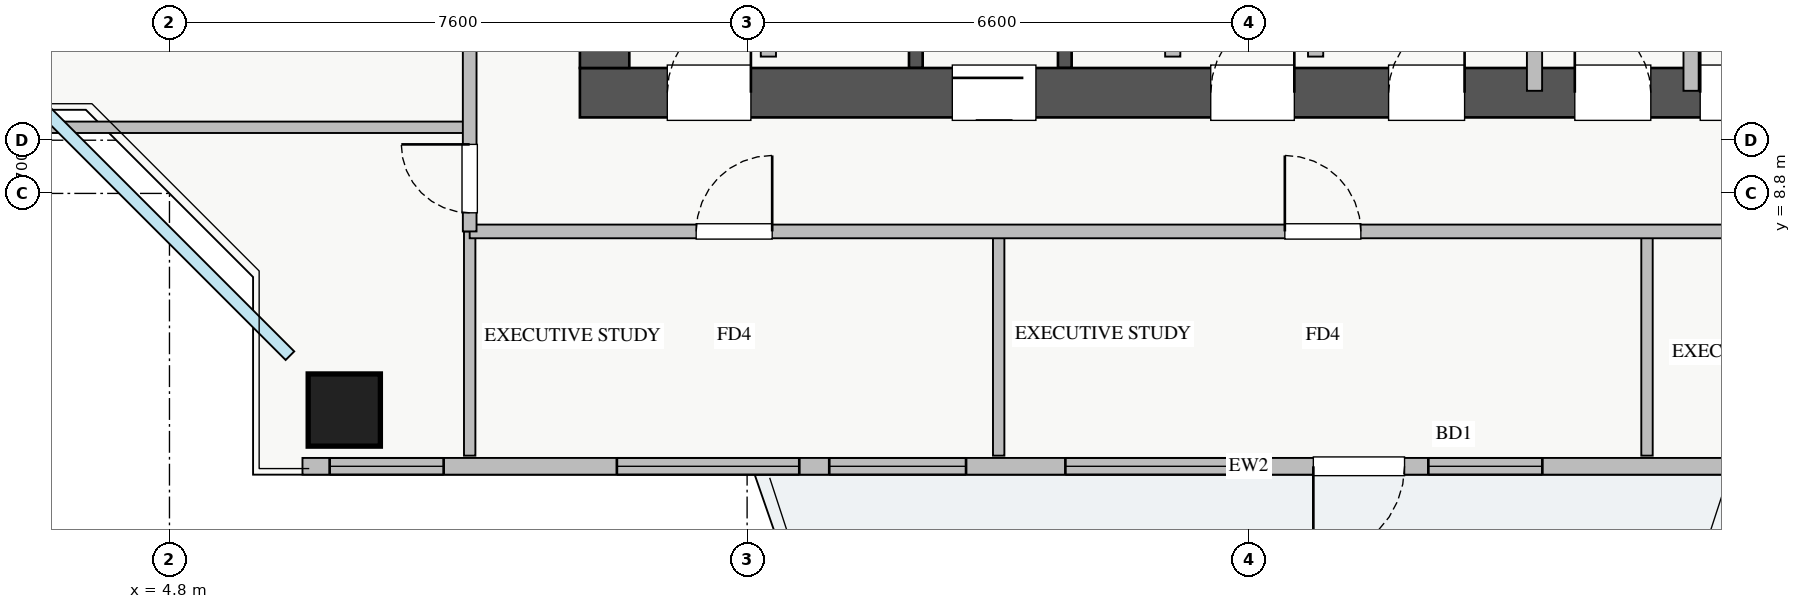
"""IFC4 building model, lengths in metres.
Left out: names, types, materials, properties, quantities, classifications, styles, units other than length and angle.
Written with IfcOpenShell. Run it as: python <this file> out.ifc"""

import sys

from ifc_helpers import new_model, si_unit, direction, frame, frame_2d, origin, origin_2d, place, context, subcontext, project, spatial, rectangle, extrude, source, transform, mapped, element, fill, save


model = new_model("IFC4")
c1 = context("Model", 3, precision=1e-05, world=origin(), true_north=direction((0.0, 1.0)))
c2 = subcontext(c1, "Body", "Model", "MODEL_VIEW")
j1 = project(units=[si_unit("LENGTHUNIT", "METRE"), si_unit("PLANEANGLEUNIT", "RADIAN")], contexts=[c1])
p1 = place(None, origin())
s1 = spatial("IfcSite", under=j1, at=p1, CompositionType="ELEMENT")
p2 = place(p1, origin())
s2 = spatial("IfcBuilding", under=s1, at=p2, CompositionType="ELEMENT")
p3 = place(p2, frame((0.0, 0.0, 150.25)))
s3 = spatial("IfcBuildingStorey", under=s2, at=p3, CompositionType="ELEMENT", Elevation=150.25)
for number, where, z_axis, x_axis in (
    (1, (14.62, 10.45, 0.0), (0.0, 0.0, 1.0), (0.0, 1.0, 0.0)),
    (2, (16.58, 10.45, 0.0), (0.0, 0.0, 1.0), (0.0, 1.0, 0.0)),
):
    element("IfcWall", number, at=place(p3, frame(where, z_axis=z_axis, x_axis=x_axis)), inside=s3, PredefinedType="SHEAR", context=c2, shape_type="SweptSolid", body=[
        extrude(rectangle(XDim=2.35, YDim=0.18, at=frame_2d((1.175, 0.0))), origin(), (0.0, 0.0, 1.0), 3.07),
    ])
p4 = place(p3, frame((10.2, 10.125, 0.0), z_axis=(0.0, 0.0, 1.0), x_axis=(1.0, 0.0, 0.0)))
e3 = element("IfcWall", 3, at=p4, inside=s3, PredefinedType="SHEAR", context=c2, shape_type="SweptSolid", body=[
    extrude(rectangle(XDim=17.6, YDim=0.65, at=frame_2d((8.8, 0.0))), origin(), (0.0, 0.0, 1.0), 3.25),
])
p5 = place(p4, frame((1.15, 0.0, 0.0)))
e4 = element("IfcOpeningElement", 4, at=p5, cuts=e3, PredefinedType="OPENING", context=c2, shape_type="SweptSolid", body=[
    extrude(rectangle(XDim=1.1, YDim=2.05, at=frame_2d((0.55, 1.025))), frame((0.0, 0.335, 0.0), z_axis=(0.0, -1.0, 0.0), x_axis=(1.0, 0.0, 0.0)), (0.0, 0.0, 1.0), 0.67),
])
p6 = place(p4, frame((8.3, 0.0, 0.0)))
e5 = element("IfcOpeningElement", 5, at=p6, cuts=e3, PredefinedType="OPENING", context=c2, shape_type="SweptSolid", body=[
    extrude(rectangle(XDim=1.1, YDim=2.05, at=frame_2d((0.55, 1.025))), frame((0.0, 0.335, 0.0), z_axis=(0.0, -1.0, 0.0), x_axis=(1.0, 0.0, 0.0)), (0.0, 0.0, 1.0), 0.67),
])
p7 = place(p4, frame((4.9, 0.0, 0.0)))
e6 = element("IfcOpeningElement", 6, at=p7, cuts=e3, PredefinedType="OPENING", context=c2, shape_type="SweptSolid", body=[
    extrude(rectangle(XDim=1.1, YDim=2.05, at=frame_2d((0.55, 1.025))), frame((0.0, 0.335, 0.0), z_axis=(0.0, -1.0, 0.0), x_axis=(1.0, 0.0, 0.0)), (0.0, 0.0, 1.0), 0.67),
])
p8 = place(p4, frame((14.74, 0.0, 0.0)))
e7 = element("IfcOpeningElement", 7, at=p8, cuts=e3, PredefinedType="OPENING", context=c2, shape_type="SweptSolid", body=[
    extrude(rectangle(XDim=1.0, YDim=2.05, at=frame_2d((0.5, 1.025))), frame((0.0, 0.335, 0.0), z_axis=(0.0, -1.0, 0.0), x_axis=(1.0, 0.0, 0.0)), (0.0, 0.0, 1.0), 0.67),
])
p9 = place(p4, frame((10.64, 0.0, 0.0)))
e8 = element("IfcOpeningElement", 8, at=p9, cuts=e3, PredefinedType="OPENING", context=c2, shape_type="SweptSolid", body=[
    extrude(rectangle(XDim=1.0, YDim=2.05, at=frame_2d((0.5, 1.025))), frame((0.0, 0.335, 0.0), z_axis=(0.0, -1.0, 0.0), x_axis=(1.0, 0.0, 0.0)), (0.0, 0.0, 1.0), 0.67),
])
p10 = place(p4, frame((13.09, 0.0, 0.0)))
e9 = element("IfcOpeningElement", 9, at=p10, cuts=e3, PredefinedType="OPENING", context=c2, shape_type="SweptSolid", body=[
    extrude(rectangle(XDim=1.0, YDim=2.05, at=frame_2d((0.5, 1.025))), frame((0.0, 0.335, 0.0), z_axis=(0.0, -1.0, 0.0), x_axis=(1.0, 0.0, 0.0)), (0.0, 0.0, 1.0), 0.67),
])
p11 = place(p3, frame((10.525, 10.45, 0.0), z_axis=(0.0, 0.0, 1.0), x_axis=(0.0, 1.0, 0.0)))
e10 = element("IfcWall", 10, at=p11, inside=s3, PredefinedType="SHEAR", context=c2, shape_type="SweptSolid", body=[
    extrude(rectangle(XDim=5.9, YDim=0.65, at=frame_2d((2.95, 0.0))), origin(), (0.0, 0.0, 1.0), 3.25),
])
m1 = source(origin(), c2, "Body", "SweptSolid", [
    extrude(rectangle(XDim=0.95, YDim=0.95, at=origin_2d()), origin(), (0.0, 0.0, 1.0), 3.25),
])
p12 = place(p3, frame((7.1, 5.95, 0.0), z_axis=(0.0, 0.0, 1.0), x_axis=(1.0, 0.0, 0.0)))
e11 = element("IfcColumn", 11, at=p12, inside=s3, PredefinedType="COLUMN", context=c2, shape_type="MappedRepresentation", body=[
    mapped(m1, transform((0.0, 0.0, 0.0), x_axis=(1.0, 0.0, 0.0), y_axis=(0.0, 1.0, 0.0), z_axis=(0.0, 0.0, 1.0), scale=1.0)),
])
p13 = place(p3, frame((6.55, 5.21, 0.0), z_axis=(0.0, 0.0, 1.0), x_axis=(1.0, 0.0, 0.0)))
e12 = element("IfcWall", 12, at=p13, inside=s3, PredefinedType="STANDARD", context=c2, shape_type="SweptSolid", body=[
    extrude(rectangle(XDim=24.9, YDim=0.22, at=frame_2d((12.45, 0.0))), origin(), (0.0, 0.0, 1.0), 2.61),
])
p14 = place(p13, frame((13.3, 0.0, 0.0)))
e13 = element("IfcOpeningElement", 13, at=p14, cuts=e12, PredefinedType="OPENING", context=c2, shape_type="SweptSolid", body=[
    extrude(rectangle(XDim=1.2, YDim=2.1, at=frame_2d((0.6, 1.05))), frame((0.0, 0.12, 0.0), z_axis=(0.0, -1.0, 0.0), x_axis=(1.0, 0.0, 0.0)), (0.0, 0.0, 1.0), 0.24),
])
p15 = place(p13, frame((0.357, 0.0, 0.9)))
e14 = element("IfcOpeningElement", 14, at=p15, cuts=e12, PredefinedType="OPENING", context=c2, shape_type="SweptSolid", body=[
    extrude(rectangle(XDim=1.5, YDim=1.5, at=frame_2d((0.75, 0.75))), frame((0.0, 0.12, 0.0), z_axis=(0.0, -1.0, 0.0), x_axis=(1.0, 0.0, 0.0)), (0.0, 0.0, 1.0), 0.24),
])
p16 = place(p13, frame((6.931, 0.0, 0.9)))
e15 = element("IfcOpeningElement", 15, at=p16, cuts=e12, PredefinedType="OPENING", context=c2, shape_type="SweptSolid", body=[
    extrude(rectangle(XDim=1.8, YDim=1.5, at=frame_2d((0.9, 0.75))), frame((0.0, 0.12, 0.0), z_axis=(0.0, -1.0, 0.0), x_axis=(1.0, 0.0, 0.0)), (0.0, 0.0, 1.0), 0.24),
])
p17 = place(p13, frame((14.813, 0.0, 0.9)))
e16 = element("IfcOpeningElement", 16, at=p17, cuts=e12, PredefinedType="OPENING", context=c2, shape_type="SweptSolid", body=[
    extrude(rectangle(XDim=1.5, YDim=1.45, at=frame_2d((0.75, 0.725))), frame((0.0, 0.12, 0.0), z_axis=(0.0, -1.0, 0.0), x_axis=(1.0, 0.0, 0.0)), (0.0, 0.0, 1.0), 0.24),
])
p18 = place(p13, frame((20.738, 0.0, 0.9)))
e17 = element("IfcOpeningElement", 17, at=p18, cuts=e12, PredefinedType="OPENING", context=c2, shape_type="SweptSolid", body=[
    extrude(rectangle(XDim=2.1, YDim=1.48, at=frame_2d((1.05, 0.74))), frame((0.0, 0.12, 0.0), z_axis=(0.0, -1.0, 0.0), x_axis=(1.0, 0.0, 0.0)), (0.0, 0.0, 1.0), 0.24),
])
p19 = place(p13, frame((4.136, 0.0, 0.9)))
e18 = element("IfcOpeningElement", 18, at=p19, cuts=e12, PredefinedType="OPENING", context=c2, shape_type="SweptSolid", body=[
    extrude(rectangle(XDim=2.4, YDim=1.5, at=frame_2d((1.2, 0.75))), frame((0.0, 0.12, 0.0), z_axis=(0.0, -1.0, 0.0), x_axis=(1.0, 0.0, 0.0)), (0.0, 0.0, 1.0), 0.24),
])
p20 = place(p13, frame((10.038, 0.0, 0.9)))
e19 = element("IfcOpeningElement", 19, at=p20, cuts=e12, PredefinedType="OPENING", context=c2, shape_type="SweptSolid", body=[
    extrude(rectangle(XDim=2.4, YDim=1.5, at=frame_2d((1.2, 0.75))), frame((0.0, 0.12, 0.0), z_axis=(0.0, -1.0, 0.0), x_axis=(1.0, 0.0, 0.0)), (0.0, 0.0, 1.0), 0.24),
])
for number, where, z_axis, x_axis in (
    (20, (12.68, 10.6, 0.0), (0.0, 0.0, 1.0), (0.0, 1.0, 0.0)),
    (21, (18.0, 10.6, 0.0), (0.0, 0.0, 1.0), (0.0, 1.0, 0.0)),
    (22, (19.88, 10.6, 0.0), (0.0, 0.0, 1.0), (0.0, 1.0, 0.0)),
):
    element("IfcWall", number, at=place(p3, frame(where, z_axis=z_axis, x_axis=x_axis)), inside=s3, PredefinedType="PARTITIONING", context=c2, shape_type="SweptSolid", body=[
        extrude(rectangle(XDim=2.21, YDim=0.2, at=frame_2d((1.105, 0.0))), origin(), (0.0, 0.0, 1.0), 3.07),
    ])
for number, where, z_axis, x_axis in (
    (23, (24.82, 10.15, 0.0), (0.0, 0.0, 1.0), (0.0, 1.0, 0.0)),
    (24, (22.76, 10.15, 0.0), (0.0, 0.0, 1.0), (0.0, 1.0, 0.0)),
):
    element("IfcWall", number, at=place(p3, frame(where, z_axis=z_axis, x_axis=x_axis)), inside=s3, PredefinedType="PARTITIONING", context=c2, shape_type="SweptSolid", body=[
        extrude(rectangle(XDim=2.65, YDim=0.2, at=frame_2d((1.325, 0.0))), origin(), (0.0, 0.0, 1.0), 3.07),
    ])
p21 = place(p3, frame((15.71, 5.35, 0.0), z_axis=(0.0, 0.0, 1.0), x_axis=(0.0, 1.0, 0.0)))
e25 = element("IfcWall", 25, at=p21, inside=s3, PredefinedType="PARTITIONING", context=c2, shape_type="SweptSolid", body=[
    extrude(rectangle(XDim=2.95, YDim=0.15, at=frame_2d((1.475, 0.0))), origin(), (0.0, 0.0, 1.0), 2.765),
])
for number, where, z_axis, x_axis in (
    (26, (24.24, 5.35, 0.0), (0.0, 0.0, 1.0), (0.0, 1.0, 0.0)),
    (27, (8.75, 5.35, 0.0), (0.0, 0.0, 1.0), (0.0, 1.0, 0.0)),
):
    element("IfcWall", number, at=place(p3, frame(where, z_axis=z_axis, x_axis=x_axis)), inside=s3, PredefinedType="PARTITIONING", context=c2, shape_type="SweptSolid", body=[
        extrude(rectangle(XDim=2.95, YDim=0.15, at=frame_2d((1.475, 0.0))), origin(), (0.0, 0.0, 1.0), 3.07),
    ])
p22 = place(p3, frame((8.75, 8.3, 0.0), z_axis=(0.0, 0.0, 1.0), x_axis=(1.0, 0.0, 0.0)))
e28 = element("IfcWall", 28, at=p22, inside=s3, PredefinedType="PARTITIONING", context=c2, shape_type="SweptSolid", body=[
    extrude(rectangle(XDim=23.61, YDim=0.18, at=frame_2d((11.805, 0.0))), origin(), (0.0, 0.0, 1.0), 3.07),
])
p23 = place(p22, frame((2.98, 0.0, 0.0)))
e29 = element("IfcOpeningElement", 29, at=p23, cuts=e28, PredefinedType="OPENING", context=c2, shape_type="SweptSolid", body=[
    extrude(rectangle(XDim=1.0, YDim=2.05, at=frame_2d((0.5, 1.025))), frame((0.0, 0.1, 0.0), z_axis=(0.0, -1.0, 0.0), x_axis=(1.0, 0.0, 0.0)), (0.0, 0.0, 1.0), 0.2),
])
p24 = place(p22, frame((10.725, 0.0, 0.0)))
e30 = element("IfcOpeningElement", 30, at=p24, cuts=e28, PredefinedType="OPENING", context=c2, shape_type="SweptSolid", body=[
    extrude(rectangle(XDim=1.0, YDim=2.05, at=frame_2d((0.5, 1.025))), frame((0.0, 0.1, 0.0), z_axis=(0.0, -1.0, 0.0), x_axis=(1.0, 0.0, 0.0)), (0.0, 0.0, 1.0), 0.2),
])
p25 = place(p22, frame((18.86, 0.0, 0.0)))
e31 = element("IfcOpeningElement", 31, at=p25, cuts=e28, PredefinedType="OPENING", context=c2, shape_type="SweptSolid", body=[
    extrude(rectangle(XDim=1.0, YDim=2.05, at=frame_2d((0.5, 1.025))), frame((0.0, 0.1, 0.0), z_axis=(0.0, -1.0, 0.0), x_axis=(1.0, 0.0, 0.0)), (0.0, 0.0, 1.0), 0.2),
])
p26 = place(p3, frame((1.35, 9.67, 0.0), z_axis=(0.0, 0.0, 1.0), x_axis=(1.0, 0.0, 0.0)))
e32 = element("IfcWall", 32, at=p26, inside=s3, PredefinedType="PARTITIONING", context=c2, shape_type="SweptSolid", body=[
    extrude(rectangle(XDim=7.4, YDim=0.15, at=frame_2d((3.7, 0.0))), origin(), (0.0, 0.0, 1.0), 3.07),
])
p27 = place(p3, frame((8.75, 8.3, 0.0), z_axis=(0.0, 0.0, 1.0), x_axis=(0.0, 1.0, 0.0)))
e33 = element("IfcWall", 33, at=p27, inside=s3, PredefinedType="PARTITIONING", context=c2, shape_type="SweptSolid", body=[
    extrude(rectangle(XDim=29.4, YDim=0.18, at=frame_2d((14.7, 0.0))), origin(), (0.0, 0.0, 1.0), 3.07),
])
p28 = place(p27, frame((28.08, 0.0, 0.0)))
e34 = element("IfcOpeningElement", 34, at=p28, cuts=e33, PredefinedType="OPENING", context=c2, shape_type="SweptSolid", body=[
    extrude(rectangle(XDim=0.9, YDim=2.05, at=frame_2d((0.45, 1.025))), frame((0.0, 0.1, 0.0), z_axis=(0.0, -1.0, 0.0), x_axis=(1.0, 0.0, 0.0)), (0.0, 0.0, 1.0), 0.2),
])
p29 = place(p27, frame((0.245, 0.0, 0.0)))
e35 = element("IfcOpeningElement", 35, at=p29, cuts=e33, PredefinedType="OPENING", context=c2, shape_type="SweptSolid", body=[
    extrude(rectangle(XDim=0.9, YDim=2.05, at=frame_2d((0.45, 1.025))), frame((0.0, 0.1, 0.0), z_axis=(0.0, -1.0, 0.0), x_axis=(1.0, 0.0, 0.0)), (0.0, 0.0, 1.0), 0.2),
])
p30 = place(p27, frame((5.0, 0.0, 0.0)))
e36 = element("IfcOpeningElement", 36, at=p30, cuts=e33, PredefinedType="OPENING", context=c2, shape_type="SweptSolid", body=[
    extrude(rectangle(XDim=1.0, YDim=2.05, at=frame_2d((0.5, 1.025))), frame((0.0, 0.1, 0.0), z_axis=(0.0, -1.0, 0.0), x_axis=(1.0, 0.0, 0.0)), (0.0, 0.0, 1.0), 0.2),
])
p31 = place(p27, frame((11.165, 0.0, 0.0)))
e37 = element("IfcOpeningElement", 37, at=p31, cuts=e33, PredefinedType="OPENING", context=c2, shape_type="SweptSolid", body=[
    extrude(rectangle(XDim=1.0, YDim=2.05, at=frame_2d((0.5, 1.025))), frame((0.0, 0.1, 0.0), z_axis=(0.0, -1.0, 0.0), x_axis=(1.0, 0.0, 0.0)), (0.0, 0.0, 1.0), 0.2),
])
p32 = place(p27, frame((20.325, 0.0, 0.0)))
e38 = element("IfcOpeningElement", 38, at=p32, cuts=e33, PredefinedType="OPENING", context=c2, shape_type="SweptSolid", body=[
    extrude(rectangle(XDim=1.0, YDim=2.05, at=frame_2d((0.5, 1.025))), frame((0.0, 0.1, 0.0), z_axis=(0.0, -1.0, 0.0), x_axis=(1.0, 0.0, 0.0)), (0.0, 0.0, 1.0), 0.2),
])
m2 = source(origin(), c2, "Body", "SweptSolid", [
    extrude(rectangle(XDim=1.2, YDim=2.1, at=frame_2d((0.6, 1.05))), frame((0.0, 0.025, 0.0), z_axis=(0.0, -1.0, 0.0), x_axis=(1.0, 0.0, 0.0)), (0.0, 0.0, 1.0), 0.05),
])
p33 = place(p14, frame((1.2, 0.0, 0.0), z_axis=(0.0, 0.0, 1.0), x_axis=(-1.0, 0.0, 0.0)))
e39 = element("IfcDoor", 39, at=p33, inside=s3, OperationType="SINGLE_SWING_LEFT", PredefinedType="DOOR", context=c2, shape_type="MappedRepresentation", body=[
    mapped(m2, transform((0.0, 0.0, 0.0), x_axis=(1.0, 0.0, 0.0), y_axis=(0.0, 1.0, 0.0), z_axis=(0.0, 0.0, 1.0), scale=1.0)),
])
fill(e13, e39)
m3 = source(origin(), c2, "Body", "SweptSolid", [
    extrude(rectangle(XDim=1.5, YDim=1.5, at=frame_2d((0.75, 0.75))), frame((0.0, 0.03, 0.0), z_axis=(0.0, -1.0, 0.0), x_axis=(1.0, 0.0, 0.0)), (0.0, 0.0, 1.0), 0.06),
])
p34 = place(p15, origin())
e40 = element("IfcWindow", 40, at=p34, inside=s3, PartitioningType="TRIPLE_PANEL_VERTICAL", PredefinedType="WINDOW", context=c2, shape_type="MappedRepresentation", body=[
    mapped(m3, transform((0.0, 0.0, 0.0), x_axis=(1.0, 0.0, 0.0), y_axis=(0.0, 1.0, 0.0), z_axis=(0.0, 0.0, 1.0), scale=1.0)),
])
fill(e14, e40)
m4 = source(origin(), c2, "Body", "SweptSolid", [
    extrude(rectangle(XDim=1.8, YDim=1.5, at=frame_2d((0.9, 0.75))), frame((0.0, 0.03, 0.0), z_axis=(0.0, -1.0, 0.0), x_axis=(1.0, 0.0, 0.0)), (0.0, 0.0, 1.0), 0.06),
])
p35 = place(p16, origin())
e41 = element("IfcWindow", 41, at=p35, inside=s3, PartitioningType="DOUBLE_PANEL_VERTICAL", PredefinedType="WINDOW", context=c2, shape_type="MappedRepresentation", body=[
    mapped(m4, transform((0.0, 0.0, 0.0), x_axis=(1.0, 0.0, 0.0), y_axis=(0.0, 1.0, 0.0), z_axis=(0.0, 0.0, 1.0), scale=1.0)),
])
fill(e15, e41)
m5 = source(origin(), c2, "Body", "SweptSolid", [
    extrude(rectangle(XDim=1.5, YDim=1.45, at=frame_2d((0.75, 0.725))), frame((0.0, 0.03, 0.0), z_axis=(0.0, -1.0, 0.0), x_axis=(1.0, 0.0, 0.0)), (0.0, 0.0, 1.0), 0.06),
])
p36 = place(p17, origin())
e42 = element("IfcWindow", 42, at=p36, inside=s3, PartitioningType="DOUBLE_PANEL_VERTICAL", PredefinedType="WINDOW", context=c2, shape_type="MappedRepresentation", body=[
    mapped(m5, transform((0.0, 0.0, 0.0), x_axis=(1.0, 0.0, 0.0), y_axis=(0.0, 1.0, 0.0), z_axis=(0.0, 0.0, 1.0), scale=1.0)),
])
fill(e16, e42)
m6 = source(origin(), c2, "Body", "SweptSolid", [
    extrude(rectangle(XDim=1.1, YDim=2.05, at=frame_2d((0.55, 1.025))), frame((0.0, 0.025, 0.0), z_axis=(0.0, -1.0, 0.0), x_axis=(1.0, 0.0, 0.0)), (0.0, 0.0, 1.0), 0.05),
])
p37 = place(p5, origin())
e43 = element("IfcDoor", 43, at=p37, inside=s3, OperationType="SINGLE_SWING_RIGHT", PredefinedType="DOOR", context=c2, shape_type="MappedRepresentation", body=[
    mapped(m6, transform((0.0, 0.0, 0.0), x_axis=(1.0, 0.0, 0.0), y_axis=(0.0, 1.0, 0.0), z_axis=(0.0, 0.0, 1.0), scale=1.0)),
])
fill(e4, e43)
p38 = place(p6, origin())
e44 = element("IfcDoor", 44, at=p38, inside=s3, OperationType="SINGLE_SWING_RIGHT", PredefinedType="DOOR", context=c2, shape_type="MappedRepresentation", body=[
    mapped(m6, transform((0.0, 0.0, 0.0), x_axis=(1.0, 0.0, 0.0), y_axis=(0.0, 1.0, 0.0), z_axis=(0.0, 0.0, 1.0), scale=1.0)),
])
fill(e5, e44)
p39 = place(p7, origin())
e45 = element("IfcDoor", 45, at=p39, inside=s3, OperationType="SLIDING_TO_RIGHT", PredefinedType="DOOR", context=c2, shape_type="MappedRepresentation", body=[
    mapped(m6, transform((0.0, 0.0, 0.0), x_axis=(1.0, 0.0, 0.0), y_axis=(0.0, 1.0, 0.0), z_axis=(0.0, 0.0, 1.0), scale=1.0)),
])
fill(e6, e45)
m7 = source(origin(), c2, "Body", "SweptSolid", [
    extrude(rectangle(XDim=1.0, YDim=2.05, at=frame_2d((0.5, 1.025))), frame((0.0, 0.025, 0.0), z_axis=(0.0, -1.0, 0.0), x_axis=(1.0, 0.0, 0.0)), (0.0, 0.0, 1.0), 0.05),
])
p40 = place(p8, origin())
e46 = element("IfcDoor", 46, at=p40, inside=s3, OperationType="SINGLE_SWING_LEFT", PredefinedType="DOOR", context=c2, shape_type="MappedRepresentation", body=[
    mapped(m7, transform((0.0, 0.0, 0.0), x_axis=(1.0, 0.0, 0.0), y_axis=(0.0, 1.0, 0.0), z_axis=(0.0, 0.0, 1.0), scale=1.0)),
])
fill(e7, e46)
p41 = place(p9, origin())
e47 = element("IfcDoor", 47, at=p41, inside=s3, OperationType="SINGLE_SWING_RIGHT", PredefinedType="DOOR", context=c2, shape_type="MappedRepresentation", body=[
    mapped(m7, transform((0.0, 0.0, 0.0), x_axis=(1.0, 0.0, 0.0), y_axis=(0.0, 1.0, 0.0), z_axis=(0.0, 0.0, 1.0), scale=1.0)),
])
fill(e8, e47)
p42 = place(p10, origin())
e48 = element("IfcDoor", 48, at=p42, inside=s3, OperationType="SINGLE_SWING_LEFT", PredefinedType="DOOR", context=c2, shape_type="MappedRepresentation", body=[
    mapped(m7, transform((0.0, 0.0, 0.0), x_axis=(1.0, 0.0, 0.0), y_axis=(0.0, 1.0, 0.0), z_axis=(0.0, 0.0, 1.0), scale=1.0)),
])
fill(e9, e48)
p43 = place(p23, origin())
e49 = element("IfcDoor", 49, at=p43, inside=s3, OperationType="SINGLE_SWING_RIGHT", PredefinedType="DOOR", context=c2, shape_type="MappedRepresentation", body=[
    mapped(m7, transform((0.0, 0.0, 0.0), x_axis=(1.0, 0.0, 0.0), y_axis=(0.0, 1.0, 0.0), z_axis=(0.0, 0.0, 1.0), scale=1.0)),
])
fill(e29, e49)
p44 = place(p24, origin())
e50 = element("IfcDoor", 50, at=p44, inside=s3, OperationType="SINGLE_SWING_LEFT", PredefinedType="DOOR", context=c2, shape_type="MappedRepresentation", body=[
    mapped(m7, transform((0.0, 0.0, 0.0), x_axis=(1.0, 0.0, 0.0), y_axis=(0.0, 1.0, 0.0), z_axis=(0.0, 0.0, 1.0), scale=1.0)),
])
fill(e30, e50)
m8 = source(origin(), c2, "Body", "SweptSolid", [
    extrude(rectangle(XDim=0.9, YDim=2.05, at=frame_2d((0.45, 1.025))), frame((0.0, 0.025, 0.0), z_axis=(0.0, -1.0, 0.0), x_axis=(1.0, 0.0, 0.0)), (0.0, 0.0, 1.0), 0.05),
])
p45 = place(p29, origin())
e51 = element("IfcDoor", 51, at=p45, inside=s3, OperationType="SINGLE_SWING_RIGHT", PredefinedType="DOOR", context=c2, shape_type="MappedRepresentation", body=[
    mapped(m8, transform((0.0, 0.0, 0.0), x_axis=(1.0, 0.0, 0.0), y_axis=(0.0, 1.0, 0.0), z_axis=(0.0, 0.0, 1.0), scale=1.0)),
])
fill(e35, e51)
m9 = source(origin(), c2, "Body", "SweptSolid", [
    extrude(rectangle(XDim=2.4, YDim=1.5, at=frame_2d((1.2, 0.75))), frame((0.0, 0.03, 0.0), z_axis=(0.0, -1.0, 0.0), x_axis=(1.0, 0.0, 0.0)), (0.0, 0.0, 1.0), 0.06),
])
p46 = place(p19, origin())
e52 = element("IfcWindow", 52, at=p46, inside=s3, PartitioningType="TRIPLE_PANEL_VERTICAL", PredefinedType="WINDOW", context=c2, shape_type="MappedRepresentation", body=[
    mapped(m9, transform((0.0, 0.0, 0.0), x_axis=(1.0, 0.0, 0.0), y_axis=(0.0, 1.0, 0.0), z_axis=(0.0, 0.0, 1.0), scale=1.0)),
])
fill(e18, e52)
p47 = place(p20, origin())
e53 = element("IfcWindow", 53, at=p47, inside=s3, PartitioningType="TRIPLE_PANEL_VERTICAL", PredefinedType="WINDOW", context=c2, shape_type="MappedRepresentation", body=[
    mapped(m9, transform((0.0, 0.0, 0.0), x_axis=(1.0, 0.0, 0.0), y_axis=(0.0, 1.0, 0.0), z_axis=(0.0, 0.0, 1.0), scale=1.0)),
])
fill(e19, e53)
save(model, sys.argv[1])
